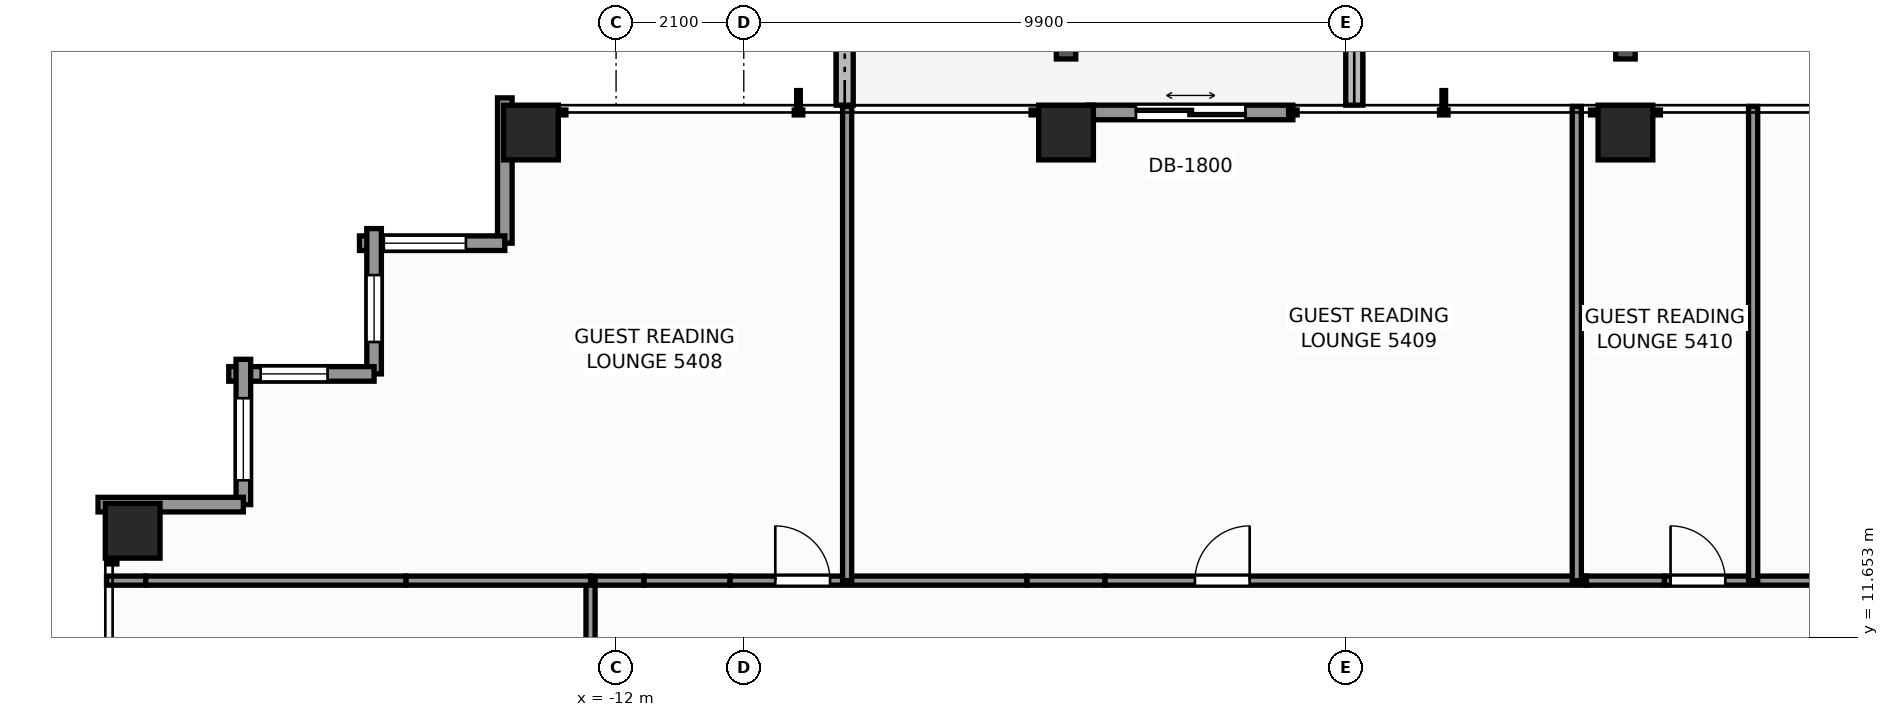
"""IFC4 building model, lengths in metres.
Left out: names, types, materials, properties, quantities, classifications, styles, units other than length and angle.
Written with IfcOpenShell. Run it as: python <this file> out.ifc"""

import sys

from ifc_helpers import new_model, si_unit, direction, frame, frame_2d, origin, origin_2d, place, context, subcontext, project, spatial, rectangle, extrude, element, fill, save


model = new_model("IFC4")
c1 = context("Model", 3, precision=1e-05, world=origin(), true_north=direction((0.0, 1.0)))
c2 = subcontext(c1, "Body", "Model", "MODEL_VIEW")
j1 = project(units=[si_unit("LENGTHUNIT", "METRE"), si_unit("PLANEANGLEUNIT", "RADIAN")], contexts=[c1])
p1 = place(None, origin())
s1 = spatial("IfcSite", under=j1, at=p1, CompositionType="ELEMENT")
p2 = place(p1, origin())
s2 = spatial("IfcBuilding", under=s1, at=p2, CompositionType="ELEMENT")
p3 = place(p2, frame((0.0, 0.0, 186.6)))
s3 = spatial("IfcBuildingStorey", under=s2, at=p3, CompositionType="ELEMENT", Elevation=186.6)
for number, where, z_axis, x_axis in (
    (1, (-13.4, 19.95, 0.0), (0.0, 0.0, 1.0), (1.0, 0.0, 0.0)),
    (2, (-4.6, 19.95, 0.0), (0.0, 0.0, 1.0), (1.0, 0.0, 0.0)),
    (3, (4.6, 19.95, 0.0), (0.0, 0.0, 1.0), (1.0, 0.0, 0.0)),
    (4, (-19.95, 13.4, 0.0), (0.0, 0.0, 1.0), (1.0, 0.0, 0.0)),
):
    element("IfcColumn", number, at=place(p3, frame(where, z_axis=z_axis, x_axis=x_axis)), inside=s3, PredefinedType="COLUMN", context=c2, shape_type="SweptSolid", body=[
        extrude(rectangle(XDim=0.9, YDim=0.9, at=origin_2d()), origin(), (0.0, 0.0, 1.0), 3.3),
    ])
for number, where, z_axis, x_axis in (
    (5, (0.14, 20.4, -0.04), (0.0, 0.0, 1.0), (0.0, 1.0, 0.0)),
    (6, (-8.24, 23.7, -0.04), (0.0, 0.0, 1.0), (0.0, -1.0, 0.0)),
):
    element("IfcWall", number, at=place(p3, frame(where, z_axis=z_axis, x_axis=x_axis)), inside=s3, PredefinedType="PARAPET", context=c2, shape_type="SweptSolid", body=[
        extrude(rectangle(XDim=3.3, YDim=0.28, at=frame_2d((1.65, 0.0))), origin(), (0.0, 0.0, 1.0), 0.42),
    ])
p4 = place(p3, frame((-4.23, 20.28, 0.0), z_axis=(0.0, 0.0, 1.0), x_axis=(1.0, 0.0, 0.0)))
e7 = element("IfcWall", 7, at=p4, inside=s3, PredefinedType="STANDARD", context=c2, shape_type="SweptSolid", body=[
    extrude(rectangle(XDim=3.36, YDim=0.24, at=frame_2d((1.68, 0.0))), origin(), (0.0, 0.0, 1.0), 3.08),
])
p5 = place(p4, frame((0.78, 0.0, 0.0)))
e8 = element("IfcOpeningElement", 8, at=p5, cuts=e7, PredefinedType="OPENING", context=c2, shape_type="SweptSolid", body=[
    extrude(rectangle(XDim=1.8, YDim=2.2, at=frame_2d((0.9, 1.1))), frame((0.0, 0.13, 0.0), z_axis=(0.0, -1.0, 0.0), x_axis=(1.0, 0.0, 0.0)), (0.0, 0.0, 1.0), 0.26),
])
p6 = place(p3, frame((-13.83, 18.13, 0.0), z_axis=(0.0, 0.0, 1.0), x_axis=(0.0, 1.0, 0.0)))
e9 = element("IfcWall", 9, at=p6, inside=s3, PredefinedType="STANDARD", context=c2, shape_type="SweptSolid", body=[
    extrude(rectangle(XDim=2.39, YDim=0.24, at=frame_2d((1.195, 0.0))), origin(), (0.0, 0.0, 1.0), 1.275),
])
p7 = place(p3, frame((-16.22, 18.13, 0.0), z_axis=(0.0, 0.0, 1.0), x_axis=(1.0, 0.0, 0.0)))
e10 = element("IfcWall", 10, at=p7, inside=s3, PredefinedType="STANDARD", context=c2, shape_type="SweptSolid", body=[
    extrude(rectangle(XDim=2.39, YDim=0.24, at=frame_2d((1.195, 0.0))), origin(), (0.0, 0.0, 1.0), 2.463),
])
p8 = place(p7, frame((0.4, 0.0, 0.65)))
e11 = element("IfcOpeningElement", 11, at=p8, cuts=e10, PredefinedType="OPENING", context=c2, shape_type="SweptSolid", body=[
    extrude(rectangle(XDim=1.35, YDim=1.55, at=frame_2d((0.675, 0.775))), frame((0.0, 0.13, 0.0), z_axis=(0.0, -1.0, 0.0), x_axis=(1.0, 0.0, 0.0)), (0.0, 0.0, 1.0), 0.26),
])
p9 = place(p3, frame((-15.98, 15.98, 0.0), z_axis=(0.0, 0.0, 1.0), x_axis=(0.0, 1.0, 0.0)))
e12 = element("IfcWall", 12, at=p9, inside=s3, PredefinedType="STANDARD", context=c2, shape_type="SweptSolid", body=[
    extrude(rectangle(XDim=2.39, YDim=0.24, at=frame_2d((1.195, 0.0))), origin(), (0.0, 0.0, 1.0), 2.463),
])
p10 = place(p9, frame((0.525, 0.0, 0.65)))
e13 = element("IfcOpeningElement", 13, at=p10, cuts=e12, PredefinedType="OPENING", context=c2, shape_type="SweptSolid", body=[
    extrude(rectangle(XDim=1.1, YDim=1.45, at=frame_2d((0.55, 0.725))), frame((0.0, 0.13, 0.0), z_axis=(0.0, -1.0, 0.0), x_axis=(1.0, 0.0, 0.0)), (0.0, 0.0, 1.0), 0.26),
])
p11 = place(p3, frame((-18.37, 15.98, 0.0), z_axis=(0.0, 0.0, 1.0), x_axis=(1.0, 0.0, 0.0)))
e14 = element("IfcWall", 14, at=p11, inside=s3, PredefinedType="STANDARD", context=c2, shape_type="SweptSolid", body=[
    extrude(rectangle(XDim=2.39, YDim=0.24, at=frame_2d((1.195, 0.0))), origin(), (0.0, 0.0, 1.0), 2.463),
])
p12 = place(p11, frame((0.525, 0.0, 0.65)))
e15 = element("IfcOpeningElement", 15, at=p12, cuts=e14, PredefinedType="OPENING", context=c2, shape_type="SweptSolid", body=[
    extrude(rectangle(XDim=1.1, YDim=1.45, at=frame_2d((0.55, 0.725))), frame((0.0, 0.13, 0.0), z_axis=(0.0, -1.0, 0.0), x_axis=(1.0, 0.0, 0.0)), (0.0, 0.0, 1.0), 0.26),
])
p13 = place(p3, frame((-18.13, 13.83, 0.0), z_axis=(0.0, 0.0, 1.0), x_axis=(0.0, 1.0, 0.0)))
e16 = element("IfcWall", 16, at=p13, inside=s3, PredefinedType="STANDARD", context=c2, shape_type="SweptSolid", body=[
    extrude(rectangle(XDim=2.39, YDim=0.24, at=frame_2d((1.195, 0.0))), origin(), (0.0, 0.0, 1.0), 2.463),
])
p14 = place(p13, frame((0.4, 0.0, 0.65)))
e17 = element("IfcOpeningElement", 17, at=p14, cuts=e16, PredefinedType="OPENING", context=c2, shape_type="SweptSolid", body=[
    extrude(rectangle(XDim=1.35, YDim=1.55, at=frame_2d((0.675, 0.775))), frame((0.0, 0.13, 0.0), z_axis=(0.0, -1.0, 0.0), x_axis=(1.0, 0.0, 0.0)), (0.0, 0.0, 1.0), 0.26),
])
p15 = place(p3, frame((-20.52, 13.83, 0.0), z_axis=(0.0, 0.0, 1.0), x_axis=(1.0, 0.0, 0.0)))
e18 = element("IfcWall", 18, at=p15, inside=s3, PredefinedType="STANDARD", context=c2, shape_type="SweptSolid", body=[
    extrude(rectangle(XDim=2.39, YDim=0.24, at=frame_2d((1.195, 0.0))), origin(), (0.0, 0.0, 1.0), 1.275),
])
p16 = place(p3, frame((-12.42, 12.58, 0.0), z_axis=(0.0, 0.0, 1.0), x_axis=(1.0, 0.0, 0.0)))
e19 = element("IfcWall", 19, at=p16, inside=s3, PredefinedType="PARTITIONING", context=c2, shape_type="SweptSolid", body=[
    extrude(rectangle(XDim=0.878, YDim=0.15, at=frame_2d((0.439, 0.0))), origin(), (0.0, 0.0, 1.0), 3.08),
])
p17 = place(p3, frame((-11.542, 12.58, 0.0), z_axis=(0.0, 0.0, 1.0), x_axis=(1.0, 0.0, 0.0)))
e20 = element("IfcWall", 20, at=p17, inside=s3, PredefinedType="PARTITIONING", context=c2, shape_type="SweptSolid", body=[
    extrude(rectangle(XDim=1.417, YDim=0.15, at=frame_2d((0.708, 0.0))), origin(), (0.0, 0.0, 1.0), 1.265),
])
p18 = place(p3, frame((-10.125, 12.58, 0.0), z_axis=(0.0, 0.0, 1.0), x_axis=(1.0, 0.0, 0.0)))
e21 = element("IfcWall", 21, at=p18, inside=s3, PredefinedType="PARTITIONING", context=c2, shape_type="SweptSolid", body=[
    extrude(rectangle(XDim=4.883, YDim=0.15, at=frame_2d((2.441, 0.0))), origin(), (0.0, 0.0, 1.0), 3.08),
])
p19 = place(p18, frame((0.743, 0.0, 0.0)))
e22 = element("IfcOpeningElement", 22, at=p19, cuts=e21, PredefinedType="OPENING", context=c2, shape_type="SweptSolid", body=[
    extrude(rectangle(XDim=0.9, YDim=2.06, at=frame_2d((0.45, 1.03))), frame((0.0, 0.085, 0.0), z_axis=(0.0, -1.0, 0.0), x_axis=(1.0, 0.0, 0.0)), (0.0, 0.0, 1.0), 0.17),
])
p20 = place(p3, frame((-5.242, 12.58, 0.0), z_axis=(0.0, 0.0, 1.0), x_axis=(1.0, 0.0, 0.0)))
e23 = element("IfcWall", 23, at=p20, inside=s3, PredefinedType="PARTITIONING", context=c2, shape_type="SweptSolid", body=[
    extrude(rectangle(XDim=1.284, YDim=0.15, at=frame_2d((0.642, 0.0))), origin(), (0.0, 0.0, 1.0), 1.265),
])
p21 = place(p3, frame((-3.958, 12.58, 0.0), z_axis=(0.0, 0.0, 1.0), x_axis=(1.0, 0.0, 0.0)))
e24 = element("IfcWall", 24, at=p21, inside=s3, PredefinedType="PARTITIONING", context=c2, shape_type="SweptSolid", body=[
    extrude(rectangle(XDim=7.916, YDim=0.15, at=frame_2d((3.958, 0.0))), origin(), (0.0, 0.0, 1.0), 2.605),
])
p22 = place(p21, frame((1.478, 0.0, 0.0)))
e25 = element("IfcOpeningElement", 25, at=p22, cuts=e24, PredefinedType="OPENING", context=c2, shape_type="SweptSolid", body=[
    extrude(rectangle(XDim=0.9, YDim=2.06, at=frame_2d((0.45, 1.03))), frame((0.0, 0.085, 0.0), z_axis=(0.0, -1.0, 0.0), x_axis=(1.0, 0.0, 0.0)), (0.0, 0.0, 1.0), 0.17),
])
p23 = place(p3, frame((3.958, 12.58, 0.0), z_axis=(0.0, 0.0, 1.0), x_axis=(1.0, 0.0, 0.0)))
e26 = element("IfcWall", 26, at=p23, inside=s3, PredefinedType="PARTITIONING", context=c2, shape_type="SweptSolid", body=[
    extrude(rectangle(XDim=1.284, YDim=0.15, at=frame_2d((0.642, 0.0))), origin(), (0.0, 0.0, 1.0), 1.265),
])
p24 = place(p3, frame((5.242, 12.58, 0.0), z_axis=(0.0, 0.0, 1.0), x_axis=(1.0, 0.0, 0.0)))
e27 = element("IfcWall", 27, at=p24, inside=s3, PredefinedType="PARTITIONING", context=c2, shape_type="SweptSolid", body=[
    extrude(rectangle(XDim=4.883, YDim=0.15, at=frame_2d((2.441, 0.0))), origin(), (0.0, 0.0, 1.0), 3.08),
])
p25 = place(p24, frame((0.1, 0.0, 0.0)))
e28 = element("IfcOpeningElement", 28, at=p25, cuts=e27, PredefinedType="OPENING", context=c2, shape_type="SweptSolid", body=[
    extrude(rectangle(XDim=0.9, YDim=2.06, at=frame_2d((0.45, 1.03))), frame((0.0, 0.085, 0.0), z_axis=(0.0, -1.0, 0.0), x_axis=(1.0, 0.0, 0.0)), (0.0, 0.0, 1.0), 0.17),
])
p26 = place(p24, frame((2.538, 0.0, 0.0)))
e29 = element("IfcOpeningElement", 29, at=p26, cuts=e27, PredefinedType="OPENING", context=c2, shape_type="SweptSolid", body=[
    extrude(rectangle(XDim=0.9, YDim=2.06, at=frame_2d((0.45, 1.03))), frame((0.0, 0.085, 0.0), z_axis=(0.0, -1.0, 0.0), x_axis=(1.0, 0.0, 0.0)), (0.0, 0.0, 1.0), 0.17),
])
p27 = place(p3, frame((-12.42, 11.486, 0.0), z_axis=(0.0, 0.0, 1.0), x_axis=(0.0, 1.0, 0.0)))
e30 = element("IfcWall", 30, at=p27, inside=s3, PredefinedType="PARTITIONING", context=c2, shape_type="SweptSolid", body=[
    extrude(rectangle(XDim=1.094, YDim=0.15, at=frame_2d((0.547, 0.0))), origin(), (0.0, 0.0, 1.0), 3.08),
])
p28 = place(p3, frame((-20.38, 12.58, 0.0), z_axis=(0.0, 0.0, 1.0), x_axis=(1.0, 0.0, 0.0)))
e31 = element("IfcWall", 31, at=p28, inside=s3, PredefinedType="PARTITIONING", context=c2, shape_type="SweptSolid", body=[
    extrude(rectangle(XDim=0.644, YDim=0.15, at=frame_2d((0.322, 0.0))), origin(), (0.0, 0.0, 1.0), 2.453),
])
p29 = place(p3, frame((-19.736, 12.58, 0.0), z_axis=(0.0, 0.0, 1.0), x_axis=(1.0, 0.0, 0.0)))
e32 = element("IfcWall", 32, at=p29, inside=s3, PredefinedType="PARTITIONING", context=c2, shape_type="SweptSolid", body=[
    extrude(rectangle(XDim=4.281, YDim=0.15, at=frame_2d((2.141, 0.0))), origin(), (0.0, 0.0, 1.0), 1.265),
])
p30 = place(p3, frame((-15.455, 12.58, 0.0), z_axis=(0.0, 0.0, 1.0), x_axis=(1.0, 0.0, 0.0)))
e33 = element("IfcWall", 33, at=p30, inside=s3, PredefinedType="PARTITIONING", context=c2, shape_type="SweptSolid", body=[
    extrude(rectangle(XDim=3.035, YDim=0.15, at=frame_2d((1.518, 0.0))), origin(), (0.0, 0.0, 1.0), 3.08),
])
for number, where, z_axis, x_axis in (
    (34, (-8.2, 12.58, 0.0), (0.0, 0.0, 1.0), (0.0, 1.0, 0.0)),
    (35, (3.8, 12.58, 0.0), (0.0, 0.0, 1.0), (0.0, 1.0, 0.0)),
    (36, (6.7, 12.58, 0.0), (0.0, 0.0, 1.0), (0.0, 1.0, 0.0)),
):
    element("IfcWall", number, at=place(p3, frame(where, z_axis=z_axis, x_axis=x_axis)), inside=s3, PredefinedType="PARTITIONING", context=c2, shape_type="SweptSolid", body=[
        extrude(rectangle(XDim=7.8, YDim=0.15, at=frame_2d((3.9, 0.0))), origin(), (0.0, 0.0, 1.0), 2.453),
    ])
p31 = place(p5, origin())
e37 = element("IfcDoor", 37, at=p31, inside=s3, OperationType="DOUBLE_DOOR_SLIDING", PredefinedType="DOOR", context=c2, shape_type="SweptSolid", body=[
    extrude(rectangle(XDim=1.8, YDim=2.2, at=frame_2d((0.9, 1.1))), frame((0.0, 0.025, 0.0), z_axis=(0.0, -1.0, 0.0), x_axis=(1.0, 0.0, 0.0)), (0.0, 0.0, 1.0), 0.05),
])
fill(e8, e37)
p32 = place(p8, origin())
e38 = element("IfcWindow", 38, at=p32, inside=s3, PartitioningType="SINGLE_PANEL", PredefinedType="WINDOW", context=c2, shape_type="SweptSolid", body=[
    extrude(rectangle(XDim=1.35, YDim=1.55, at=frame_2d((0.675, 0.775))), frame((0.0, 0.03, 0.0), z_axis=(0.0, -1.0, 0.0), x_axis=(1.0, 0.0, 0.0)), (0.0, 0.0, 1.0), 0.06),
])
fill(e11, e38)
p33 = place(p10, origin())
e39 = element("IfcWindow", 39, at=p33, inside=s3, PartitioningType="SINGLE_PANEL", PredefinedType="WINDOW", context=c2, shape_type="SweptSolid", body=[
    extrude(rectangle(XDim=1.1, YDim=1.45, at=frame_2d((0.55, 0.725))), frame((0.0, 0.03, 0.0), z_axis=(0.0, -1.0, 0.0), x_axis=(1.0, 0.0, 0.0)), (0.0, 0.0, 1.0), 0.06),
])
fill(e13, e39)
p34 = place(p12, origin())
e40 = element("IfcWindow", 40, at=p34, inside=s3, PartitioningType="SINGLE_PANEL", PredefinedType="WINDOW", context=c2, shape_type="SweptSolid", body=[
    extrude(rectangle(XDim=1.1, YDim=1.45, at=frame_2d((0.55, 0.725))), frame((0.0, 0.03, 0.0), z_axis=(0.0, -1.0, 0.0), x_axis=(1.0, 0.0, 0.0)), (0.0, 0.0, 1.0), 0.06),
])
fill(e15, e40)
p35 = place(p14, origin())
e41 = element("IfcWindow", 41, at=p35, inside=s3, PartitioningType="SINGLE_PANEL", PredefinedType="WINDOW", context=c2, shape_type="SweptSolid", body=[
    extrude(rectangle(XDim=1.35, YDim=1.55, at=frame_2d((0.675, 0.775))), frame((0.0, 0.03, 0.0), z_axis=(0.0, -1.0, 0.0), x_axis=(1.0, 0.0, 0.0)), (0.0, 0.0, 1.0), 0.06),
])
fill(e17, e41)
p36 = place(p19, origin())
e42 = element("IfcDoor", 42, at=p36, inside=s3, OperationType="SINGLE_SWING_LEFT", PredefinedType="DOOR", context=c2, shape_type="SweptSolid", body=[
    extrude(rectangle(XDim=0.9, YDim=2.06, at=frame_2d((0.45, 1.03))), frame((0.0, 0.025, 0.0), z_axis=(0.0, -1.0, 0.0), x_axis=(1.0, 0.0, 0.0)), (0.0, 0.0, 1.0), 0.05),
])
fill(e22, e42)
p37 = place(p22, origin())
e43 = element("IfcDoor", 43, at=p37, inside=s3, OperationType="SINGLE_SWING_RIGHT", PredefinedType="DOOR", context=c2, shape_type="SweptSolid", body=[
    extrude(rectangle(XDim=0.9, YDim=2.06, at=frame_2d((0.45, 1.03))), frame((0.0, 0.025, 0.0), z_axis=(0.0, -1.0, 0.0), x_axis=(1.0, 0.0, 0.0)), (0.0, 0.0, 1.0), 0.05),
])
fill(e25, e43)
p38 = place(p25, origin())
e44 = element("IfcDoor", 44, at=p38, inside=s3, OperationType="SINGLE_SWING_LEFT", PredefinedType="DOOR", context=c2, shape_type="SweptSolid", body=[
    extrude(rectangle(XDim=0.9, YDim=2.06, at=frame_2d((0.45, 1.03))), frame((0.0, 0.025, 0.0), z_axis=(0.0, -1.0, 0.0), x_axis=(1.0, 0.0, 0.0)), (0.0, 0.0, 1.0), 0.05),
])
fill(e28, e44)
save(model, sys.argv[1])
